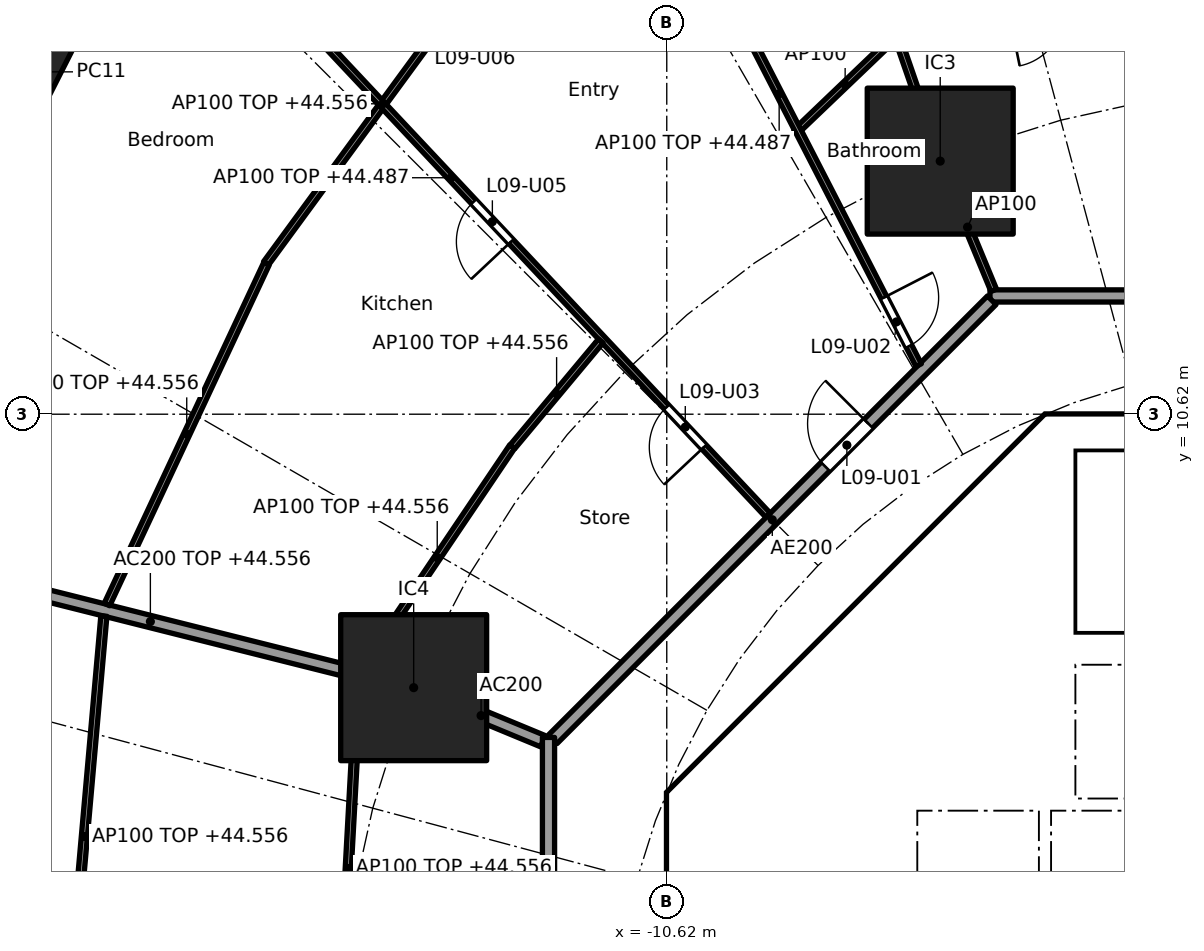
"""IFC4 building model, lengths in metres.
Left out: names, types, materials, properties, quantities, classifications, styles, units other than length and angle.
Written with IfcOpenShell. Run it as: python <this file> out.ifc"""

import sys

from ifc_helpers import new_model, si_unit, direction, frame, frame_2d, origin, origin_2d, place, context, subcontext, project, spatial, polyline, rectangle, hollow_rectangle, outline, extrude, element, fill, save


model = new_model("IFC4")
c1 = context("Model", 3, precision=1e-05, world=origin(), true_north=direction((0.0, 1.0)))
c2 = subcontext(c1, "Body", "Model", "MODEL_VIEW")
j1 = project(units=[si_unit("LENGTHUNIT", "METRE"), si_unit("PLANEANGLEUNIT", "RADIAN")], contexts=[c1])
p1 = place(None, origin())
s1 = spatial("IfcSite", under=j1, at=p1, CompositionType="ELEMENT")
p2 = place(p1, origin())
s2 = spatial("IfcBuilding", under=s1, at=p2, CompositionType="ELEMENT")
p3 = place(p2, frame((0.0, 0.0, 41.8)))
s3 = spatial("IfcBuildingStorey", under=s2, at=p3, CompositionType="ELEMENT", Elevation=41.8)
p4 = place(p3, frame((-21.082, 16.25, 0.0), z_axis=(0.0, 0.0, 1.0), x_axis=(-0.452462697578, -0.891783329795, 0.0)))
e1 = element("IfcColumn", 1, at=p4, inside=s3, PredefinedType="COLUMN", context=c2, shape_type="SweptSolid", body=[
    extrude(hollow_rectangle(XDim=1.4, YDim=0.9, WallThickness=0.05, at=origin_2d()), origin(), (0.0, 0.0, 1.0), 3.7),
])
for number, where, z_axis, x_axis in (
    (2, (-6.123, 14.782, 0.0), (0.0, 0.0, 1.0), (1.0, 0.0, 0.0)),
    (3, (-14.782, 6.123, 0.0), (0.0, 0.0, 1.0), (1.0, 0.0, 0.0)),
):
    element("IfcColumn", number, at=place(p3, frame(where, z_axis=z_axis, x_axis=x_axis)), inside=s3, PredefinedType="COLUMN", context=c2, shape_type="SweptSolid", body=[
        extrude(rectangle(XDim=2.4, YDim=2.4, at=origin_2d()), origin(), (0.0, 0.0, 1.0), 3.7),
    ])
p5 = place(p3, frame((-4.613, 9.988, 0.0), z_axis=(0.0, 0.0, 1.0), x_axis=(-0.707106781187, -0.707106781187, 0.0)))
e4 = element("IfcWall", 4, at=p5, inside=s3, PredefinedType="SHEAR", context=c2, shape_type="SweptSolid", body=[
    extrude(rectangle(XDim=7.602, YDim=0.6, at=frame_2d((3.801, 0.0))), origin(), (0.0, 0.0, 1.0), 3.44),
])
p6 = place(p5, frame((0.351, 0.0, 0.0)))
e5 = element("IfcOpeningElement", 5, at=p6, cuts=e4, PredefinedType="OPENING", context=c2, shape_type="SweptSolid", body=[
    extrude(rectangle(XDim=1.1, YDim=2.1, at=frame_2d((0.55, 1.05))), frame((0.0, 0.31, 0.0), z_axis=(0.0, -1.0, 0.0), x_axis=(1.0, 0.0, 0.0)), (0.0, 0.0, 1.0), 0.62),
])
p7 = place(p3, frame((-10.325, 3.801, 0.0), z_axis=(0.0, 0.0, 1.0), x_axis=(0.0, -1.0, 0.0)))
e6 = element("IfcWall", 6, at=p7, inside=s3, PredefinedType="SHEAR", context=c2, shape_type="SweptSolid", body=[
    extrude(rectangle(XDim=7.602, YDim=0.6, at=frame_2d((3.801, 0.0))), origin(), (0.0, 0.0, 1.0), 3.44),
])
p8 = place(p7, frame((0.651, 0.0, 0.0)))
e7 = element("IfcOpeningElement", 7, at=p8, cuts=e6, PredefinedType="OPENING", context=c2, shape_type="SweptSolid", body=[
    extrude(rectangle(XDim=1.5, YDim=2.1, at=frame_2d((0.75, 1.05))), frame((0.0, 0.31, 0.0), z_axis=(0.0, -1.0, 0.0), x_axis=(1.0, 0.0, 0.0)), (0.0, 0.0, 1.0), 0.62),
])
p9 = place(p7, frame((5.451, 0.0, 0.0)))
e8 = element("IfcOpeningElement", 8, at=p9, cuts=e6, PredefinedType="OPENING", context=c2, shape_type="SweptSolid", body=[
    extrude(rectangle(XDim=1.5, YDim=2.1, at=frame_2d((0.75, 1.05))), frame((0.0, 0.31, 0.0), z_axis=(0.0, -1.0, 0.0), x_axis=(1.0, 0.0, 0.0)), (0.0, 0.0, 1.0), 0.62),
])
p10 = place(p3, frame((-6.2, 4.3, 0.0), z_axis=(0.0, 0.0, 1.0), x_axis=(0.0, 1.0, 0.0)))
e9 = element("IfcWall", 9, at=p10, inside=s3, PredefinedType="PARTITIONING", context=c2, shape_type="SweptSolid", body=[
    extrude(rectangle(XDim=3.527, YDim=0.15, at=frame_2d((1.763, 0.0))), origin(), (0.0, 0.0, 1.0), 3.44),
])
p11 = place(p10, frame((0.262, 0.0, 0.0)))
e10 = element("IfcOpeningElement", 10, at=p11, cuts=e9, PredefinedType="OPENING", context=c2, shape_type="SweptSolid", body=[
    extrude(rectangle(XDim=0.9, YDim=2.1, at=frame_2d((0.45, 1.05))), frame((0.0, 0.085, 0.0), z_axis=(0.0, -1.0, 0.0), x_axis=(1.0, 0.0, 0.0)), (0.0, 0.0, 1.0), 0.17),
])
p12 = place(p10, frame((2.138, 0.0, 0.0)))
e11 = element("IfcOpeningElement", 11, at=p12, cuts=e9, PredefinedType="OPENING", context=c2, shape_type="SweptSolid", body=[
    extrude(rectangle(XDim=0.9, YDim=2.1, at=frame_2d((0.45, 1.05))), frame((0.0, 0.085, 0.0), z_axis=(0.0, -1.0, 0.0), x_axis=(1.0, 0.0, 0.0)), (0.0, 0.0, 1.0), 0.17),
])
p13 = place(p3, frame((-4.0, 4.3, 0.0), z_axis=(0.0, 0.0, 1.0), x_axis=(0.0, 1.0, 0.0)))
e12 = element("IfcWall", 12, at=p13, inside=s3, PredefinedType="SOLIDWALL", context=c2, shape_type="SweptSolid", body=[
    extrude(rectangle(XDim=2.2, YDim=0.2, at=frame_2d((1.1, 0.0))), origin(), (0.0, 0.0, 1.0), 3.44),
])
p14 = place(p13, frame((0.55, 0.0, 0.0)))
e13 = element("IfcOpeningElement", 13, at=p14, cuts=e12, PredefinedType="OPENING", context=c2, shape_type="SweptSolid", body=[
    extrude(rectangle(XDim=1.1, YDim=2.1, at=frame_2d((0.55, 1.05))), frame((0.0, 0.11, 0.0), z_axis=(0.0, -1.0, 0.0), x_axis=(1.0, 0.0, 0.0)), (0.0, 0.0, 1.0), 0.22),
])
p15 = place(p3, origin())
e14 = element("IfcWall", 14, at=p15, inside=s3, PredefinedType="SHEAR", context=c2, shape_type="SweptSolid", body=[
    extrude(outline(polyline([(-10.2, 4.825), (-9.776, 4.401), (-10.025, 4.152), (-10.025, 3.801), (-10.625, 3.801), (-10.625, 4.401), (-10.2, 4.825)])), origin(), (0.0, 0.0, 1.0), 3.44),
])
p16 = place(p3, origin())
e15 = element("IfcWall", 15, at=p16, inside=s3, PredefinedType="SHEAR", context=c2, shape_type="SweptSolid", body=[
    extrude(outline(polyline([(-4.152, 10.025), (-4.401, 9.776), (-4.825, 10.2), (-4.401, 10.625), (4.401, 10.625), (4.825, 10.2), (4.401, 9.776), (4.152, 10.025), (-4.152, 10.025)])), origin(), (0.0, 0.0, 1.0), 3.44),
])
p17 = place(p3, frame((-10.025, 4.0, 0.0), z_axis=(0.0, 0.0, 1.0), x_axis=(1.0, 0.0, 0.0)))
e16 = element("IfcWall", 16, at=p17, inside=s3, PredefinedType="PARTITIONING", context=c2, shape_type="SweptSolid", body=[
    extrude(rectangle(XDim=3.325, YDim=0.2, at=frame_2d((1.662, 0.0))), origin(), (0.0, 0.0, 1.0), 3.44),
])
p18 = place(p3, frame((-8.301, 5.8, 0.0), z_axis=(0.0, 0.0, 1.0), x_axis=(1.0, 0.0, 0.0)))
e17 = element("IfcWall", 17, at=p18, inside=s3, PredefinedType="PARTITIONING", context=c2, shape_type="SweptSolid", body=[
    extrude(rectangle(XDim=2.026, YDim=0.15, at=frame_2d((1.013, 0.0))), origin(), (0.0, 0.0, 1.0), 3.44),
])
p19 = place(p3, origin())
e18 = element("IfcWall", 18, at=p19, inside=s3, PredefinedType="SOLIDWALL", context=c2, shape_type="SweptSolid", body=[
    extrude(outline(polyline([(-6.5, 2.1), (-6.7, 2.1), (-6.7, 4.3), (6.7, 4.3), (6.7, 2.1), (6.5, 2.1), (6.5, 4.1), (4.5, 4.1), (4.5, 2.1), (4.3, 2.1), (4.3, 4.1), (2.3, 4.1), (2.3, 2.1), (2.1, 2.1), (2.1, 4.1), (0.1, 4.1), (0.1, 2.1), (-0.1, 2.1), (-0.1, 4.1), (-2.1, 4.1), (-2.1, 2.1), (-2.3, 2.1), (-2.3, 4.1), (-4.3, 4.1), (-4.3, 2.1), (-4.5, 2.1), (-4.5, 4.1), (-6.5, 4.1), (-6.5, 2.1)])), origin(), (0.0, 0.0, 1.0), 3.44),
])
p20 = place(p3, origin())
e19 = element("IfcWall", 19, at=p20, inside=s3, PredefinedType="SOLIDWALL", context=c2, shape_type="SweptSolid", body=[
    extrude(outline(polyline([(-3.9, 7.025), (-4.1, 7.025), (-4.1, 10.025), (-3.9, 10.025), (-3.9, 7.025)])), origin(), (0.0, 0.0, 1.0), 3.44),
])
p21 = place(p3, origin())
e20 = element("IfcWall", 20, at=p21, inside=s3, PredefinedType="SOLIDWALL", context=c2, shape_type="SweptSolid", body=[
    extrude(outline(polyline([(4.1, 6.5), (-4.1, 6.5), (-4.1, 7.025), (4.1, 7.025), (4.1, 6.5)])), origin(), (0.0, 0.0, 1.0), 3.44),
])
p22 = place(p3, frame((-12.657, 5.243, 0.0), z_axis=(0.0, 0.0, 1.0), x_axis=(-0.923885664896, 0.382668627144, 0.0)))
e21 = element("IfcWall", 21, at=p22, inside=s3, PredefinedType="PARTITIONING", context=c2, shape_type="SweptSolid", body=[
    extrude(rectangle(XDim=2.2, YDim=0.2, at=frame_2d((1.1, 0.0))), origin(), (0.0, 0.0, 1.0), 3.44),
])
p23 = place(p3, frame((-14.831, 6.135, 0.0), z_axis=(0.0, 0.0, 1.0), x_axis=(-0.969884949569, 0.243563512454, 0.0)))
e22 = element("IfcWall", 22, at=p23, inside=s3, PredefinedType="PARTITIONING", context=c2, shape_type="SweptSolid", body=[
    extrude(rectangle(XDim=8.829, YDim=0.2, at=frame_2d((4.415, 0.0))), origin(), (0.0, 0.0, 1.0), 2.756),
])
p24 = place(p3, frame((5.104, 12.565, 0.0), z_axis=(0.0, 0.0, 1.0), x_axis=(-1.0, 0.0, 0.0)))
e23 = element("IfcWall", 23, at=p24, inside=s3, PredefinedType="PARTITIONING", context=c2, shape_type="SweptSolid", body=[
    extrude(rectangle(XDim=10.409, YDim=0.2, at=frame_2d((5.205, 0.0))), origin(), (0.0, 0.0, 1.0), 3.44),
])
p25 = place(p3, frame((-5.275, 12.494, 0.0), z_axis=(0.0, 0.0, 1.0), x_axis=(-0.707106781187, -0.707106781187, 0.0)))
e24 = element("IfcWall", 24, at=p25, inside=s3, PredefinedType="PARTITIONING", context=c2, shape_type="SweptSolid", body=[
    extrude(rectangle(XDim=10.209, YDim=0.2, at=frame_2d((5.104, 0.0))), origin(), (0.0, 0.0, 1.0), 3.44),
])
p26 = place(p25, frame((2.87, 0.0, 0.0)))
e25 = element("IfcOpeningElement", 25, at=p26, cuts=e24, PredefinedType="OPENING", context=c2, shape_type="SweptSolid", body=[
    extrude(rectangle(XDim=1.0, YDim=2.1, at=frame_2d((0.5, 1.05))), frame((0.0, 0.11, 0.0), z_axis=(0.0, -1.0, 0.0), x_axis=(1.0, 0.0, 0.0)), (0.0, 0.0, 1.0), 0.22),
])
p27 = place(p3, frame((-12.565, 5.304, 0.0), z_axis=(0.0, 0.0, 1.0), x_axis=(0.0, -1.0, 0.0)))
e26 = element("IfcWall", 26, at=p27, inside=s3, PredefinedType="PARTITIONING", context=c2, shape_type="SweptSolid", body=[
    extrude(rectangle(XDim=10.409, YDim=0.2, at=frame_2d((5.205, 0.0))), origin(), (0.0, 0.0, 1.0), 3.44),
])
p28 = place(p3, frame((-5.243, 12.657, 0.0), z_axis=(0.0, 0.0, 1.0), x_axis=(-0.382719158442, 0.923864733477, 0.0)))
e27 = element("IfcWall", 27, at=p28, inside=s3, PredefinedType="PARTITIONING", context=c2, shape_type="SweptSolid", body=[
    extrude(rectangle(XDim=2.25, YDim=0.1, at=frame_2d((1.125, 0.0))), origin(), (0.0, 0.0, 1.0), 3.44),
])
p29 = place(p3, frame((-6.139, 14.829, 0.0), z_axis=(0.0, 0.0, 1.0), x_axis=(-0.327183700812, 0.944960753642, 0.0)))
e28 = element("IfcWall", 28, at=p29, inside=s3, PredefinedType="PARTITIONING", context=c2, shape_type="SweptSolid", body=[
    extrude(rectangle(XDim=8.14, YDim=0.1, at=frame_2d((4.07, 0.0))), origin(), (0.0, 0.0, 1.0), 3.44),
])
p30 = place(p3, frame((-6.876, 16.817, 0.0), z_axis=(0.0, 0.0, 1.0), x_axis=(-0.722762371977, -0.691096631199, 0.0)))
e29 = element("IfcWall", 29, at=p30, inside=s3, PredefinedType="PARTITIONING", context=c2, shape_type="SweptSolid", body=[
    extrude(rectangle(XDim=2.244, YDim=0.1, at=frame_2d((1.122, 0.0))), origin(), (0.0, 0.0, 1.0), 3.44),
])
p31 = place(p3, frame((-6.477, 11.427, 0.0), z_axis=(0.0, 0.0, 1.0), x_axis=(-0.457464037982, 0.889228122561, 0.0)))
e30 = element("IfcWall", 30, at=p31, inside=s3, PredefinedType="PARTITIONING", context=c2, shape_type="SweptSolid", body=[
    extrude(rectangle(XDim=10.032, YDim=0.1, at=frame_2d((5.016, 0.0))), origin(), (0.0, 0.0, 1.0), 2.687),
])
p32 = place(p31, frame((0.35, 0.0, 0.0)))
e31 = element("IfcOpeningElement", 31, at=p32, cuts=e30, PredefinedType="OPENING", context=c2, shape_type="SweptSolid", body=[
    extrude(rectangle(XDim=0.9, YDim=2.1, at=frame_2d((0.45, 1.05))), frame((0.0, 0.06, 0.0), z_axis=(0.0, -1.0, 0.0), x_axis=(1.0, 0.0, 0.0)), (0.0, 0.0, 1.0), 0.12),
])
p33 = place(p31, frame((6.735, 0.0, 0.0)))
e32 = element("IfcOpeningElement", 32, at=p33, cuts=e30, PredefinedType="OPENING", context=c2, shape_type="SweptSolid", body=[
    extrude(rectangle(XDim=0.9, YDim=2.1, at=frame_2d((0.45, 1.05))), frame((0.0, 0.06, 0.0), z_axis=(0.0, -1.0, 0.0), x_axis=(1.0, 0.0, 0.0)), (0.0, 0.0, 1.0), 0.12),
])
p34 = place(p3, frame((-13.362, 18.35, 0.0), z_axis=(0.0, 0.0, 1.0), x_axis=(-0.591191311491, -0.806531359104, 0.0)))
e33 = element("IfcWall", 33, at=p34, inside=s3, PredefinedType="PARTITIONING", context=c2, shape_type="SweptSolid", body=[
    extrude(rectangle(XDim=6.51, YDim=0.1, at=frame_2d((3.255, 0.0))), origin(), (0.0, 0.0, 1.0), 2.756),
])
p35 = place(p34, frame((1.202, 0.0, 0.0)))
e34 = element("IfcOpeningElement", 34, at=p35, cuts=e33, PredefinedType="OPENING", context=c2, shape_type="SweptSolid", body=[
    extrude(rectangle(XDim=0.9, YDim=2.1, at=frame_2d((0.45, 1.05))), frame((0.0, 0.06, 0.0), z_axis=(0.0, -1.0, 0.0), x_axis=(1.0, 0.0, 0.0)), (0.0, 0.0, 1.0), 0.12),
])
p36 = place(p3, frame((-8.953, 8.958, 0.0), z_axis=(0.0, 0.0, 1.0), x_axis=(-0.684574307023, 0.728943082939, 0.0)))
e35 = element("IfcWall", 35, at=p36, inside=s3, PredefinedType="PARTITIONING", context=c2, shape_type="SweptSolid", body=[
    extrude(rectangle(XDim=15.231, YDim=0.1, at=frame_2d((7.615, 0.0))), origin(), (0.0, 0.0, 1.0), 2.687),
])
p37 = place(p36, frame((1.54, 0.0, 0.0)))
e36 = element("IfcOpeningElement", 36, at=p37, cuts=e35, PredefinedType="OPENING", context=c2, shape_type="SweptSolid", body=[
    extrude(rectangle(XDim=0.9, YDim=2.1, at=frame_2d((0.45, 1.05))), frame((0.0, 0.06, 0.0), z_axis=(0.0, -1.0, 0.0), x_axis=(1.0, 0.0, 0.0)), (0.0, 0.0, 1.0), 0.12),
])
p38 = place(p36, frame((6.174, 0.0, 0.0)))
e37 = element("IfcOpeningElement", 37, at=p38, cuts=e35, PredefinedType="OPENING", context=c2, shape_type="SweptSolid", body=[
    extrude(rectangle(XDim=0.9, YDim=2.1, at=frame_2d((0.45, 1.05))), frame((0.0, 0.06, 0.0), z_axis=(0.0, -1.0, 0.0), x_axis=(1.0, 0.0, 0.0)), (0.0, 0.0, 1.0), 0.12),
])
p39 = place(p36, frame((11.8, 0.0, 0.0)))
e38 = element("IfcOpeningElement", 38, at=p39, cuts=e35, PredefinedType="OPENING", context=c2, shape_type="SweptSolid", body=[
    extrude(rectangle(XDim=0.9, YDim=2.1, at=frame_2d((0.45, 1.05))), frame((0.0, 0.06, 0.0), z_axis=(0.0, -1.0, 0.0), x_axis=(1.0, 0.0, 0.0)), (0.0, 0.0, 1.0), 0.12),
])
p40 = place(p3, frame((-11.705, 11.825, 0.0), z_axis=(0.0, 0.0, 1.0), x_axis=(-0.640861724905, -0.767656335577, 0.0)))
e39 = element("IfcWall", 39, at=p40, inside=s3, PredefinedType="PARTITIONING", context=c2, shape_type="SweptSolid", body=[
    extrude(rectangle(XDim=2.268, YDim=0.1, at=frame_2d((1.134, 0.0))), origin(), (0.0, 0.0, 1.0), 2.756),
])
p41 = place(p3, frame((-13.162, 10.087, 0.0), z_axis=(0.0, 0.0, 1.0), x_axis=(-0.55912750241, -0.829081682375, 0.0)))
e40 = element("IfcWall", 40, at=p41, inside=s3, PredefinedType="PARTITIONING", context=c2, shape_type="SweptSolid", body=[
    extrude(rectangle(XDim=4.408, YDim=0.1, at=frame_2d((2.204, 0.0))), origin(), (0.0, 0.0, 1.0), 2.756),
])
p42 = place(p3, frame((-17.203, 13.095, 0.0), z_axis=(0.0, 0.0, 1.0), x_axis=(-0.423926333401, -0.905696673202, 0.0)))
e41 = element("IfcWall", 41, at=p42, inside=s3, PredefinedType="PARTITIONING", context=c2, shape_type="SweptSolid", body=[
    extrude(rectangle(XDim=6.188, YDim=0.1, at=frame_2d((3.094, 0.0))), origin(), (0.0, 0.0, 1.0), 2.756),
])
p43 = place(p3, frame((-15.688, 6.249, 0.0), z_axis=(0.0, 0.0, 1.0), x_axis=(-0.054659814056, -0.998505034903, 0.0)))
e42 = element("IfcWall", 42, at=p43, inside=s3, PredefinedType="PARTITIONING", context=c2, shape_type="SweptSolid", body=[
    extrude(rectangle(XDim=6.208, YDim=0.1, at=frame_2d((3.104, 0.0))), origin(), (0.0, 0.0, 1.0), 2.756),
])
p44 = place(p3, frame((-19.877, 7.301, 0.0), z_axis=(0.0, 0.0, 1.0), x_axis=(-0.088143415068, -0.996107794558, 0.0)))
e43 = element("IfcWall", 43, at=p44, inside=s3, PredefinedType="PARTITIONING", context=c2, shape_type="SweptSolid", body=[
    extrude(rectangle(XDim=7.279, YDim=0.1, at=frame_2d((3.64, 0.0))), origin(), (0.0, 0.0, 1.0), 2.756),
])
p45 = place(p14, origin())
e44 = element("IfcDoor", 44, at=p45, inside=s3, OperationType="DOUBLE_DOOR_SLIDING", PredefinedType="DOOR", context=c2, shape_type="SweptSolid", body=[
    extrude(rectangle(XDim=1.1, YDim=2.1, at=frame_2d((0.55, 1.05))), frame((0.0, 0.025, 0.0), z_axis=(0.0, -1.0, 0.0), x_axis=(1.0, 0.0, 0.0)), (0.0, 0.0, 1.0), 0.05),
])
fill(e13, e44)
p46 = place(p11, origin())
e45 = element("IfcDoor", 45, at=p46, inside=s3, OperationType="SINGLE_SWING_RIGHT", PredefinedType="DOOR", context=c2, shape_type="SweptSolid", body=[
    extrude(rectangle(XDim=0.9, YDim=2.1, at=frame_2d((0.45, 1.05))), frame((0.0, 0.025, 0.0), z_axis=(0.0, -1.0, 0.0), x_axis=(1.0, 0.0, 0.0)), (0.0, 0.0, 1.0), 0.05),
])
fill(e10, e45)
p47 = place(p12, origin())
e46 = element("IfcDoor", 46, at=p47, inside=s3, OperationType="SINGLE_SWING_RIGHT", PredefinedType="DOOR", context=c2, shape_type="SweptSolid", body=[
    extrude(rectangle(XDim=0.9, YDim=2.1, at=frame_2d((0.45, 1.05))), frame((0.0, 0.025, 0.0), z_axis=(0.0, -1.0, 0.0), x_axis=(1.0, 0.0, 0.0)), (0.0, 0.0, 1.0), 0.05),
])
fill(e11, e46)
p48 = place(p8, origin())
e47 = element("IfcDoor", 47, at=p48, inside=s3, OperationType="DOUBLE_DOOR_SINGLE_SWING", PredefinedType="DOOR", context=c2, shape_type="SweptSolid", body=[
    extrude(rectangle(XDim=1.5, YDim=2.1, at=frame_2d((0.75, 1.05))), frame((0.0, 0.025, 0.0), z_axis=(0.0, -1.0, 0.0), x_axis=(1.0, 0.0, 0.0)), (0.0, 0.0, 1.0), 0.05),
])
fill(e7, e47)
p49 = place(p6, origin())
e48 = element("IfcDoor", 48, at=p49, inside=s3, OperationType="SINGLE_SWING_RIGHT", PredefinedType="DOOR", context=c2, shape_type="SweptSolid", body=[
    extrude(rectangle(XDim=1.1, YDim=2.1, at=frame_2d((0.55, 1.05))), frame((0.0, 0.025, 0.0), z_axis=(0.0, -1.0, 0.0), x_axis=(1.0, 0.0, 0.0)), (0.0, 0.0, 1.0), 0.05),
])
fill(e5, e48)
p50 = place(p26, frame((1.0, 0.0, 0.0), x_axis=(-1.0, 0.0, 0.0)))
e49 = element("IfcDoor", 49, at=p50, inside=s3, OperationType="SINGLE_SWING_RIGHT", PredefinedType="DOOR", context=c2, shape_type="SweptSolid", body=[
    extrude(rectangle(XDim=1.0, YDim=2.1, at=frame_2d((0.5, 1.05))), frame((0.0, 0.025, 0.0), z_axis=(0.0, -1.0, 0.0), x_axis=(1.0, 0.0, 0.0)), (0.0, 0.0, 1.0), 0.05),
])
fill(e25, e49)
p51 = place(p32, frame((0.9, 0.0, 0.0), x_axis=(-1.0, 0.0, 0.0)))
e50 = element("IfcDoor", 50, at=p51, inside=s3, OperationType="SINGLE_SWING_LEFT", PredefinedType="DOOR", context=c2, shape_type="SweptSolid", body=[
    extrude(rectangle(XDim=0.9, YDim=2.1, at=frame_2d((0.45, 1.05))), frame((0.0, 0.025, 0.0), z_axis=(0.0, -1.0, 0.0), x_axis=(1.0, 0.0, 0.0)), (0.0, 0.0, 1.0), 0.05),
])
fill(e31, e50)
p52 = place(p37, origin())
e51 = element("IfcDoor", 51, at=p52, inside=s3, OperationType="SINGLE_SWING_LEFT", PredefinedType="DOOR", context=c2, shape_type="SweptSolid", body=[
    extrude(rectangle(XDim=0.9, YDim=2.1, at=frame_2d((0.45, 1.05))), frame((0.0, 0.025, 0.0), z_axis=(0.0, -1.0, 0.0), x_axis=(1.0, 0.0, 0.0)), (0.0, 0.0, 1.0), 0.05),
])
fill(e36, e51)
p53 = place(p38, origin())
e52 = element("IfcDoor", 52, at=p53, inside=s3, OperationType="SINGLE_SWING_LEFT", PredefinedType="DOOR", context=c2, shape_type="SweptSolid", body=[
    extrude(rectangle(XDim=0.9, YDim=2.1, at=frame_2d((0.45, 1.05))), frame((0.0, 0.025, 0.0), z_axis=(0.0, -1.0, 0.0), x_axis=(1.0, 0.0, 0.0)), (0.0, 0.0, 1.0), 0.05),
])
fill(e37, e52)
save(model, sys.argv[1])
